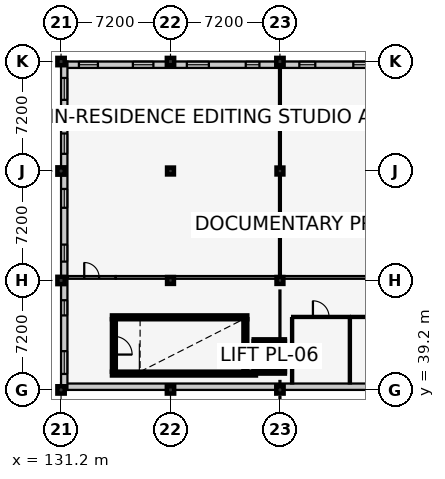
"""IFC4 building model, lengths in metres.
Left out: names, types, materials, properties, quantities, classifications, styles, units other than length and angle.
Written with IfcOpenShell. Run it as: python <this file> out.ifc"""

import sys

from ifc_helpers import new_model, si_unit, direction, frame, frame_2d, origin, origin_2d, place, context, subcontext, project, spatial, rectangle, extrude, element, fill, save


model = new_model("IFC4")
c1 = context("Model", 3, precision=1e-05, world=origin(), true_north=direction((0.0, 1.0)))
c2 = subcontext(c1, "Body", "Model", "MODEL_VIEW")
j1 = project(units=[si_unit("LENGTHUNIT", "METRE"), si_unit("PLANEANGLEUNIT", "RADIAN")], contexts=[c1])
p1 = place(None, origin())
s1 = spatial("IfcSite", under=j1, at=p1, CompositionType="ELEMENT")
p2 = place(p1, origin())
s2 = spatial("IfcBuilding", under=s1, at=p2, CompositionType="ELEMENT")
p3 = place(p2, frame((0.0, 0.0, 13.8)))
s3 = spatial("IfcBuildingStorey", under=s2, at=p3, CompositionType="ELEMENT", Elevation=13.8)
for number, where, z_axis, x_axis in (
    (1, (131.2, 39.2, 0.0), (0.0, 0.0, 1.0), (1.0, 0.0, 0.0)),
    (2, (131.2, 46.4, 0.0), (0.0, 0.0, 1.0), (1.0, 0.0, 0.0)),
    (3, (131.2, 53.6, 0.0), (0.0, 0.0, 1.0), (1.0, 0.0, 0.0)),
    (4, (131.2, 60.8, 0.0), (0.0, 0.0, 1.0), (1.0, 0.0, 0.0)),
    (5, (138.4, 39.2, 0.0), (0.0, 0.0, 1.0), (1.0, 0.0, 0.0)),
):
    element("IfcColumn", number, at=place(p3, frame(where, z_axis=z_axis, x_axis=x_axis)), inside=s3, PredefinedType="COLUMN", context=c2, shape_type="SweptSolid", body=[
        extrude(rectangle(XDim=0.48, YDim=0.48, at=origin_2d()), origin(), (0.0, 0.0, 1.0), 4.2),
    ])
for number, where, z_axis, x_axis in (
    (6, (138.4, 46.4, 0.0), (0.0, 0.0, 1.0), (1.0, 0.0, 0.0)),
    (7, (138.4, 53.6, 0.0), (0.0, 0.0, 1.0), (1.0, 0.0, 0.0)),
):
    element("IfcColumn", number, at=place(p3, frame(where, z_axis=z_axis, x_axis=x_axis)), inside=s3, PredefinedType="COLUMN", context=c2, shape_type="SweptSolid", body=[
        extrude(rectangle(XDim=0.45, YDim=0.45, at=origin_2d()), origin(), (0.0, 0.0, 1.0), 4.2),
    ])
for number, where, z_axis, x_axis in (
    (8, (138.4, 60.8, 0.0), (0.0, 0.0, 1.0), (1.0, 0.0, 0.0)),
    (9, (145.6, 39.2, 0.0), (0.0, 0.0, 1.0), (1.0, 0.0, 0.0)),
):
    element("IfcColumn", number, at=place(p3, frame(where, z_axis=z_axis, x_axis=x_axis)), inside=s3, PredefinedType="COLUMN", context=c2, shape_type="SweptSolid", body=[
        extrude(rectangle(XDim=0.48, YDim=0.48, at=origin_2d()), origin(), (0.0, 0.0, 1.0), 4.2),
    ])
for number, where, z_axis, x_axis in (
    (10, (145.6, 46.4, 0.0), (0.0, 0.0, 1.0), (1.0, 0.0, 0.0)),
    (11, (145.6, 53.6, 0.0), (0.0, 0.0, 1.0), (1.0, 0.0, 0.0)),
):
    element("IfcColumn", number, at=place(p3, frame(where, z_axis=z_axis, x_axis=x_axis)), inside=s3, PredefinedType="COLUMN", context=c2, shape_type="SweptSolid", body=[
        extrude(rectangle(XDim=0.45, YDim=0.45, at=origin_2d()), origin(), (0.0, 0.0, 1.0), 4.2),
    ])
p4 = place(p3, frame((145.6, 60.8, 0.0), z_axis=(0.0, 0.0, 1.0), x_axis=(1.0, 0.0, 0.0)))
e12 = element("IfcColumn", 12, at=p4, inside=s3, PredefinedType="COLUMN", context=c2, shape_type="SweptSolid", body=[
    extrude(rectangle(XDim=0.48, YDim=0.48, at=origin_2d()), origin(), (0.0, 0.0, 1.0), 4.2),
])
p5 = place(p3, frame((160.0, 39.41, 0.0), z_axis=(0.0, 0.0, 1.0), x_axis=(-1.0, 0.0, 0.0)))
e13 = element("IfcWall", 13, at=p5, inside=s3, PredefinedType="SOLIDWALL", context=c2, shape_type="SweptSolid", body=[
    extrude(rectangle(XDim=28.8, YDim=0.42, at=frame_2d((14.4, 0.0))), origin(), (0.0, 0.0, 1.0), 3.255),
])
p6 = place(p3, frame((131.2, 60.59, 0.0), z_axis=(0.0, 0.0, 1.0), x_axis=(1.0, 0.0, 0.0)))
e14 = element("IfcWall", 14, at=p6, inside=s3, PredefinedType="SOLIDWALL", context=c2, shape_type="SweptSolid", body=[
    extrude(rectangle(XDim=28.8, YDim=0.42, at=frame_2d((14.4, 0.0))), origin(), (0.0, 0.0, 1.0), 3.255),
])
p7 = place(p6, frame((1.175, 0.0, 0.9)))
e15 = element("IfcOpeningElement", 15, at=p7, cuts=e14, PredefinedType="OPENING", context=c2, shape_type="SweptSolid", body=[
    extrude(rectangle(XDim=1.25, YDim=1.45, at=frame_2d((0.625, 0.725))), frame((0.0, 0.222, 0.0), z_axis=(0.0, -1.0, 0.0), x_axis=(1.0, 0.0, 0.0)), (0.0, 0.0, 1.0), 0.444),
])
p8 = place(p6, frame((4.725, 0.0, 0.9)))
e16 = element("IfcOpeningElement", 16, at=p8, cuts=e14, PredefinedType="OPENING", context=c2, shape_type="SweptSolid", body=[
    extrude(rectangle(XDim=1.35, YDim=1.45, at=frame_2d((0.675, 0.725))), frame((0.0, 0.222, 0.0), z_axis=(0.0, -1.0, 0.0), x_axis=(1.0, 0.0, 0.0)), (0.0, 0.0, 1.0), 0.444),
])
p9 = place(p6, frame((8.275, 0.0, 0.9)))
e17 = element("IfcOpeningElement", 17, at=p9, cuts=e14, PredefinedType="OPENING", context=c2, shape_type="SweptSolid", body=[
    extrude(rectangle(XDim=1.45, YDim=1.45, at=frame_2d((0.725, 0.725))), frame((0.0, 0.222, 0.0), z_axis=(0.0, -1.0, 0.0), x_axis=(1.0, 0.0, 0.0)), (0.0, 0.0, 1.0), 0.444),
])
p10 = place(p6, frame((12.15, 0.0, 0.9)))
e18 = element("IfcOpeningElement", 18, at=p10, cuts=e14, PredefinedType="OPENING", context=c2, shape_type="SweptSolid", body=[
    extrude(rectangle(XDim=0.9, YDim=1.6, at=frame_2d((0.45, 0.8))), frame((0.0, 0.222, 0.0), z_axis=(0.0, -1.0, 0.0), x_axis=(1.0, 0.0, 0.0)), (0.0, 0.0, 1.0), 0.444),
])
p11 = place(p6, frame((15.675, 0.0, 0.9)))
e19 = element("IfcOpeningElement", 19, at=p11, cuts=e14, PredefinedType="OPENING", context=c2, shape_type="SweptSolid", body=[
    extrude(rectangle(XDim=1.05, YDim=1.6, at=frame_2d((0.525, 0.8))), frame((0.0, 0.222, 0.0), z_axis=(0.0, -1.0, 0.0), x_axis=(1.0, 0.0, 0.0)), (0.0, 0.0, 1.0), 0.444),
])
p12 = place(p6, frame((19.225, 0.0, 0.9)))
e20 = element("IfcOpeningElement", 20, at=p12, cuts=e14, PredefinedType="OPENING", context=c2, shape_type="SweptSolid", body=[
    extrude(rectangle(XDim=1.15, YDim=1.6, at=frame_2d((0.575, 0.8))), frame((0.0, 0.222, 0.0), z_axis=(0.0, -1.0, 0.0), x_axis=(1.0, 0.0, 0.0)), (0.0, 0.0, 1.0), 0.444),
])
p13 = place(p6, frame((22.775, 0.0, 0.9)))
e21 = element("IfcOpeningElement", 21, at=p13, cuts=e14, PredefinedType="OPENING", context=c2, shape_type="SweptSolid", body=[
    extrude(rectangle(XDim=1.25, YDim=1.6, at=frame_2d((0.625, 0.8))), frame((0.0, 0.222, 0.0), z_axis=(0.0, -1.0, 0.0), x_axis=(1.0, 0.0, 0.0)), (0.0, 0.0, 1.0), 0.444),
])
p14 = place(p6, frame((26.31, 0.0, 0.9)))
e22 = element("IfcOpeningElement", 22, at=p14, cuts=e14, PredefinedType="OPENING", context=c2, shape_type="SweptSolid", body=[
    extrude(rectangle(XDim=1.38, YDim=1.6, at=frame_2d((0.69, 0.8))), frame((0.0, 0.222, 0.0), z_axis=(0.0, -1.0, 0.0), x_axis=(1.0, 0.0, 0.0)), (0.0, 0.0, 1.0), 0.444),
])
p15 = place(p3, frame((131.41, 39.2, 0.0), z_axis=(0.0, 0.0, 1.0), x_axis=(0.0, 1.0, 0.0)))
e23 = element("IfcWall", 23, at=p15, inside=s3, PredefinedType="SOLIDWALL", context=c2, shape_type="SweptSolid", body=[
    extrude(rectangle(XDim=21.6, YDim=0.42, at=frame_2d((10.8, 0.0))), origin(), (0.0, 0.0, 1.0), 3.215),
])
p16 = place(p15, frame((1.05, 0.0, 0.9)))
e24 = element("IfcOpeningElement", 24, at=p16, cuts=e23, PredefinedType="OPENING", context=c2, shape_type="SweptSolid", body=[
    extrude(rectangle(XDim=1.5, YDim=1.6, at=frame_2d((0.75, 0.8))), frame((0.0, 0.222, 0.0), z_axis=(0.0, -1.0, 0.0), x_axis=(1.0, 0.0, 0.0)), (0.0, 0.0, 1.0), 0.444),
])
p17 = place(p15, frame((4.9, 0.0, 0.9)))
e25 = element("IfcOpeningElement", 25, at=p17, cuts=e23, PredefinedType="OPENING", context=c2, shape_type="SweptSolid", body=[
    extrude(rectangle(XDim=1.0, YDim=1.75, at=frame_2d((0.5, 0.875))), frame((0.0, 0.222, 0.0), z_axis=(0.0, -1.0, 0.0), x_axis=(1.0, 0.0, 0.0)), (0.0, 0.0, 1.0), 0.444),
])
p18 = place(p15, frame((8.44, 0.0, 0.9)))
e26 = element("IfcOpeningElement", 26, at=p18, cuts=e23, PredefinedType="OPENING", context=c2, shape_type="SweptSolid", body=[
    extrude(rectangle(XDim=1.12, YDim=1.75, at=frame_2d((0.56, 0.875))), frame((0.0, 0.222, 0.0), z_axis=(0.0, -1.0, 0.0), x_axis=(1.0, 0.0, 0.0)), (0.0, 0.0, 1.0), 0.444),
])
p19 = place(p15, frame((11.98, 0.0, 0.9)))
e27 = element("IfcOpeningElement", 27, at=p19, cuts=e23, PredefinedType="OPENING", context=c2, shape_type="SweptSolid", body=[
    extrude(rectangle(XDim=1.24, YDim=1.75, at=frame_2d((0.62, 0.875))), frame((0.0, 0.222, 0.0), z_axis=(0.0, -1.0, 0.0), x_axis=(1.0, 0.0, 0.0)), (0.0, 0.0, 1.0), 0.444),
])
p20 = place(p15, frame((15.53, 0.0, 0.9)))
e28 = element("IfcOpeningElement", 28, at=p20, cuts=e23, PredefinedType="OPENING", context=c2, shape_type="SweptSolid", body=[
    extrude(rectangle(XDim=1.34, YDim=1.75, at=frame_2d((0.67, 0.875))), frame((0.0, 0.222, 0.0), z_axis=(0.0, -1.0, 0.0), x_axis=(1.0, 0.0, 0.0)), (0.0, 0.0, 1.0), 0.444),
])
p21 = place(p15, frame((19.08, 0.0, 0.9)))
e29 = element("IfcOpeningElement", 29, at=p21, cuts=e23, PredefinedType="OPENING", context=c2, shape_type="SweptSolid", body=[
    extrude(rectangle(XDim=1.44, YDim=1.75, at=frame_2d((0.72, 0.875))), frame((0.0, 0.222, 0.0), z_axis=(0.0, -1.0, 0.0), x_axis=(1.0, 0.0, 0.0)), (0.0, 0.0, 1.0), 0.444),
])
p22 = place(p3, frame((134.55, 40.275, 0.0), z_axis=(0.0, 0.0, 1.0), x_axis=(1.0, 0.0, 0.0)))
e30 = element("IfcWall", 30, at=p22, inside=s3, PredefinedType="SHEAR", context=c2, shape_type="SweptSolid", body=[
    extrude(rectangle(XDim=9.47, YDim=0.25, at=frame_2d((4.735, 0.0))), origin(), (0.0, 0.0, 1.0), 3.96),
])
p23 = place(p3, frame((143.45, 43.975, 0.0), z_axis=(0.0, 0.0, 1.0), x_axis=(-1.0, 0.0, 0.0)))
e31 = element("IfcWall", 31, at=p23, inside=s3, PredefinedType="SHEAR", context=c2, shape_type="SweptSolid", body=[
    extrude(rectangle(XDim=8.9, YDim=0.25, at=frame_2d((4.45, 0.0))), origin(), (0.0, 0.0, 1.0), 3.96),
])
p24 = place(p3, frame((134.675, 43.85, 0.0), z_axis=(0.0, 0.0, 1.0), x_axis=(0.0, -1.0, 0.0)))
e32 = element("IfcWall", 32, at=p24, inside=s3, PredefinedType="SHEAR", context=c2, shape_type="SweptSolid", body=[
    extrude(rectangle(XDim=3.45, YDim=0.25, at=frame_2d((1.725, 0.0))), origin(), (0.0, 0.0, 1.0), 3.96),
])
p25 = place(p24, frame((1.125, 0.0, 0.0)))
e33 = element("IfcOpeningElement", 33, at=p25, cuts=e32, PredefinedType="OPENING", context=c2, shape_type="SweptSolid", body=[
    extrude(rectangle(XDim=1.2, YDim=2.15, at=frame_2d((0.6, 1.075))), frame((0.0, 0.137, 0.0), z_axis=(0.0, -1.0, 0.0), x_axis=(1.0, 0.0, 0.0)), (0.0, 0.0, 1.0), 0.274),
])
p26 = place(p3, frame((143.325, 40.4, 0.0), z_axis=(0.0, 0.0, 1.0), x_axis=(0.0, 1.0, 0.0)))
e34 = element("IfcWall", 34, at=p26, inside=s3, PredefinedType="SHEAR", context=c2, shape_type="SweptSolid", body=[
    extrude(rectangle(XDim=3.45, YDim=0.25, at=frame_2d((1.725, 0.0))), origin(), (0.0, 0.0, 1.0), 3.96),
])
p27 = place(p3, frame((143.875, 40.4, 0.0), z_axis=(0.0, 0.0, 1.0), x_axis=(1.0, 0.0, 0.0)))
e35 = element("IfcWall", 35, at=p27, inside=s3, PredefinedType="SHEAR", context=c2, shape_type="SweptSolid", body=[
    extrude(rectangle(XDim=2.05, YDim=0.25, at=frame_2d((1.025, 0.0))), origin(), (0.0, 0.0, 1.0), 3.96),
])
p28 = place(p3, frame((145.925, 42.4, 0.0), z_axis=(0.0, 0.0, 1.0), x_axis=(-1.0, 0.0, 0.0)))
e36 = element("IfcWall", 36, at=p28, inside=s3, PredefinedType="SHEAR", context=c2, shape_type="SweptSolid", body=[
    extrude(rectangle(XDim=2.05, YDim=0.25, at=frame_2d((1.025, 0.0))), origin(), (0.0, 0.0, 1.0), 3.96),
])
p29 = place(p28, frame((0.55, 0.0, 0.0)))
e37 = element("IfcOpeningElement", 37, at=p29, cuts=e36, PredefinedType="OPENING", context=c2, shape_type="SweptSolid", body=[
    extrude(rectangle(XDim=0.95, YDim=2.1, at=frame_2d((0.475, 1.05))), frame((0.0, 0.137, 0.0), z_axis=(0.0, -1.0, 0.0), x_axis=(1.0, 0.0, 0.0)), (0.0, 0.0, 1.0), 0.274),
])
for number, where, z_axis, x_axis in (
    (38, (144.0, 42.4, 0.0), (0.0, 0.0, 1.0), (0.0, -1.0, 0.0)),
    (39, (145.8, 40.4, 0.0), (0.0, 0.0, 1.0), (0.0, 1.0, 0.0)),
):
    element("IfcWall", number, at=place(p3, frame(where, z_axis=z_axis, x_axis=x_axis)), inside=s3, PredefinedType="SHEAR", context=c2, shape_type="SweptSolid", body=[
        extrude(rectangle(XDim=2.0, YDim=0.25, at=frame_2d((1.0, 0.0))), origin(), (0.0, 0.0, 1.0), 3.96),
    ])
p30 = place(p3, frame((131.63, 46.6, 0.0), z_axis=(0.0, 0.0, 1.0), x_axis=(1.0, 0.0, 0.0)))
e40 = element("IfcWall", 40, at=p30, inside=s3, PredefinedType="PARTITIONING", context=c2, shape_type="SweptSolid", body=[
    extrude(rectangle(XDim=3.17, YDim=0.18, at=frame_2d((1.585, 0.0))), origin(), (0.0, 0.0, 1.0), 3.235),
])
p31 = place(p30, frame((1.095, 0.0, 0.0)))
e41 = element("IfcOpeningElement", 41, at=p31, cuts=e40, PredefinedType="OPENING", context=c2, shape_type="SweptSolid", body=[
    extrude(rectangle(XDim=0.98, YDim=2.12, at=frame_2d((0.49, 1.06))), frame((0.0, 0.102, 0.0), z_axis=(0.0, -1.0, 0.0), x_axis=(1.0, 0.0, 0.0)), (0.0, 0.0, 1.0), 0.204),
])
p32 = place(p3, frame((134.8, 46.6, 0.0), z_axis=(0.0, 0.0, 1.0), x_axis=(1.0, 0.0, 0.0)))
e42 = element("IfcWall", 42, at=p32, inside=s3, PredefinedType="PARTITIONING", context=c2, shape_type="SweptSolid", body=[
    extrude(rectangle(XDim=24.77, YDim=0.18, at=frame_2d((12.385, 0.0))), origin(), (0.0, 0.0, 1.0), 3.085),
])
p33 = place(p32, frame((23.56, 0.0, 0.0)))
e43 = element("IfcOpeningElement", 43, at=p33, cuts=e42, PredefinedType="OPENING", context=c2, shape_type="SweptSolid", body=[
    extrude(rectangle(XDim=0.96, YDim=2.1, at=frame_2d((0.48, 1.05))), frame((0.0, 0.102, 0.0), z_axis=(0.0, -1.0, 0.0), x_axis=(1.0, 0.0, 0.0)), (0.0, 0.0, 1.0), 0.204),
])
p34 = place(p3, frame((145.6, 46.7, 0.0), z_axis=(0.0, 0.0, 1.0), x_axis=(0.0, 1.0, 0.0)))
e44 = element("IfcWall", 44, at=p34, inside=s3, PredefinedType="PARTITIONING", context=c2, shape_type="SweptSolid", body=[
    extrude(rectangle(XDim=13.67, YDim=0.125, at=frame_2d((6.835, 0.0))), origin(), (0.0, 0.0, 1.0), 3.335),
])
p35 = place(p3, frame((146.4, 44.0, 0.0), z_axis=(0.0, 0.0, 1.0), x_axis=(1.0, 0.0, 0.0)))
e45 = element("IfcWall", 45, at=p35, inside=s3, PredefinedType="PARTITIONING", context=c2, shape_type="SweptSolid", body=[
    extrude(rectangle(XDim=3.8, YDim=0.14, at=frame_2d((1.9, 0.0))), origin(), (0.0, 0.0, 1.0), 3.96),
])
p36 = place(p35, frame((1.37, 0.0, 0.0)))
e46 = element("IfcOpeningElement", 46, at=p36, cuts=e45, PredefinedType="OPENING", context=c2, shape_type="SweptSolid", body=[
    extrude(rectangle(XDim=1.06, YDim=2.1, at=frame_2d((0.53, 1.05))), frame((0.0, 0.082, 0.0), z_axis=(0.0, -1.0, 0.0), x_axis=(1.0, 0.0, 0.0)), (0.0, 0.0, 1.0), 0.164),
])
for number, where, z_axis, x_axis in (
    (47, (146.4, 39.63, 0.0), (0.0, 0.0, 1.0), (0.0, 1.0, 0.0)),
    (48, (150.2, 39.63, 0.0), (0.0, 0.0, 1.0), (0.0, 1.0, 0.0)),
):
    element("IfcWall", number, at=place(p3, frame(where, z_axis=z_axis, x_axis=x_axis)), inside=s3, PredefinedType="PARTITIONING", context=c2, shape_type="SweptSolid", body=[
        extrude(rectangle(XDim=4.29, YDim=0.14, at=frame_2d((2.145, 0.0))), origin(), (0.0, 0.0, 1.0), 3.96),
    ])
p37 = place(p3, frame((150.28, 44.0, 0.0), z_axis=(0.0, 0.0, 1.0), x_axis=(1.0, 0.0, 0.0)))
e49 = element("IfcWall", 49, at=p37, inside=s3, PredefinedType="PARTITIONING", context=c2, shape_type="SweptSolid", body=[
    extrude(rectangle(XDim=4.52, YDim=0.14, at=frame_2d((2.26, 0.0))), origin(), (0.0, 0.0, 1.0), 3.96),
])
p38 = place(p37, frame((1.815, 0.0, 0.0)))
e50 = element("IfcOpeningElement", 50, at=p38, cuts=e49, PredefinedType="OPENING", context=c2, shape_type="SweptSolid", body=[
    extrude(rectangle(XDim=0.89, YDim=2.05, at=frame_2d((0.445, 1.025))), frame((0.0, 0.082, 0.0), z_axis=(0.0, -1.0, 0.0), x_axis=(1.0, 0.0, 0.0)), (0.0, 0.0, 1.0), 0.164),
])
p39 = place(p7, origin())
e51 = element("IfcWindow", 51, at=p39, inside=s3, PartitioningType="SINGLE_PANEL", PredefinedType="WINDOW", context=c2, shape_type="SweptSolid", body=[
    extrude(rectangle(XDim=1.25, YDim=1.45, at=frame_2d((0.625, 0.725))), frame((0.0, 0.03, 0.0), z_axis=(0.0, -1.0, 0.0), x_axis=(1.0, 0.0, 0.0)), (0.0, 0.0, 1.0), 0.06),
])
fill(e15, e51)
p40 = place(p8, origin())
e52 = element("IfcWindow", 52, at=p40, inside=s3, PartitioningType="SINGLE_PANEL", PredefinedType="WINDOW", context=c2, shape_type="SweptSolid", body=[
    extrude(rectangle(XDim=1.35, YDim=1.45, at=frame_2d((0.675, 0.725))), frame((0.0, 0.03, 0.0), z_axis=(0.0, -1.0, 0.0), x_axis=(1.0, 0.0, 0.0)), (0.0, 0.0, 1.0), 0.06),
])
fill(e16, e52)
p41 = place(p9, origin())
e53 = element("IfcWindow", 53, at=p41, inside=s3, PartitioningType="SINGLE_PANEL", PredefinedType="WINDOW", context=c2, shape_type="SweptSolid", body=[
    extrude(rectangle(XDim=1.45, YDim=1.45, at=frame_2d((0.725, 0.725))), frame((0.0, 0.03, 0.0), z_axis=(0.0, -1.0, 0.0), x_axis=(1.0, 0.0, 0.0)), (0.0, 0.0, 1.0), 0.06),
])
fill(e17, e53)
p42 = place(p10, origin())
e54 = element("IfcWindow", 54, at=p42, inside=s3, PartitioningType="SINGLE_PANEL", PredefinedType="WINDOW", context=c2, shape_type="SweptSolid", body=[
    extrude(rectangle(XDim=0.9, YDim=1.6, at=frame_2d((0.45, 0.8))), frame((0.0, 0.03, 0.0), z_axis=(0.0, -1.0, 0.0), x_axis=(1.0, 0.0, 0.0)), (0.0, 0.0, 1.0), 0.06),
])
fill(e18, e54)
p43 = place(p11, origin())
e55 = element("IfcWindow", 55, at=p43, inside=s3, PartitioningType="SINGLE_PANEL", PredefinedType="WINDOW", context=c2, shape_type="SweptSolid", body=[
    extrude(rectangle(XDim=1.05, YDim=1.6, at=frame_2d((0.525, 0.8))), frame((0.0, 0.03, 0.0), z_axis=(0.0, -1.0, 0.0), x_axis=(1.0, 0.0, 0.0)), (0.0, 0.0, 1.0), 0.06),
])
fill(e19, e55)
p44 = place(p12, origin())
e56 = element("IfcWindow", 56, at=p44, inside=s3, PartitioningType="SINGLE_PANEL", PredefinedType="WINDOW", context=c2, shape_type="SweptSolid", body=[
    extrude(rectangle(XDim=1.15, YDim=1.6, at=frame_2d((0.575, 0.8))), frame((0.0, 0.03, 0.0), z_axis=(0.0, -1.0, 0.0), x_axis=(1.0, 0.0, 0.0)), (0.0, 0.0, 1.0), 0.06),
])
fill(e20, e56)
p45 = place(p16, origin())
e57 = element("IfcWindow", 57, at=p45, inside=s3, PartitioningType="SINGLE_PANEL", PredefinedType="WINDOW", context=c2, shape_type="SweptSolid", body=[
    extrude(rectangle(XDim=1.5, YDim=1.6, at=frame_2d((0.75, 0.8))), frame((0.0, 0.03, 0.0), z_axis=(0.0, -1.0, 0.0), x_axis=(1.0, 0.0, 0.0)), (0.0, 0.0, 1.0), 0.06),
])
fill(e24, e57)
p46 = place(p17, origin())
e58 = element("IfcWindow", 58, at=p46, inside=s3, PartitioningType="SINGLE_PANEL", PredefinedType="WINDOW", context=c2, shape_type="SweptSolid", body=[
    extrude(rectangle(XDim=1.0, YDim=1.75, at=frame_2d((0.5, 0.875))), frame((0.0, 0.03, 0.0), z_axis=(0.0, -1.0, 0.0), x_axis=(1.0, 0.0, 0.0)), (0.0, 0.0, 1.0), 0.06),
])
fill(e25, e58)
p47 = place(p18, origin())
e59 = element("IfcWindow", 59, at=p47, inside=s3, PartitioningType="SINGLE_PANEL", PredefinedType="WINDOW", context=c2, shape_type="SweptSolid", body=[
    extrude(rectangle(XDim=1.12, YDim=1.75, at=frame_2d((0.56, 0.875))), frame((0.0, 0.03, 0.0), z_axis=(0.0, -1.0, 0.0), x_axis=(1.0, 0.0, 0.0)), (0.0, 0.0, 1.0), 0.06),
])
fill(e26, e59)
p48 = place(p19, origin())
e60 = element("IfcWindow", 60, at=p48, inside=s3, PartitioningType="SINGLE_PANEL", PredefinedType="WINDOW", context=c2, shape_type="SweptSolid", body=[
    extrude(rectangle(XDim=1.24, YDim=1.75, at=frame_2d((0.62, 0.875))), frame((0.0, 0.03, 0.0), z_axis=(0.0, -1.0, 0.0), x_axis=(1.0, 0.0, 0.0)), (0.0, 0.0, 1.0), 0.06),
])
fill(e27, e60)
p49 = place(p20, origin())
e61 = element("IfcWindow", 61, at=p49, inside=s3, PartitioningType="SINGLE_PANEL", PredefinedType="WINDOW", context=c2, shape_type="SweptSolid", body=[
    extrude(rectangle(XDim=1.34, YDim=1.75, at=frame_2d((0.67, 0.875))), frame((0.0, 0.03, 0.0), z_axis=(0.0, -1.0, 0.0), x_axis=(1.0, 0.0, 0.0)), (0.0, 0.0, 1.0), 0.06),
])
fill(e28, e61)
p50 = place(p21, origin())
e62 = element("IfcWindow", 62, at=p50, inside=s3, PartitioningType="SINGLE_PANEL", PredefinedType="WINDOW", context=c2, shape_type="SweptSolid", body=[
    extrude(rectangle(XDim=1.44, YDim=1.75, at=frame_2d((0.72, 0.875))), frame((0.0, 0.03, 0.0), z_axis=(0.0, -1.0, 0.0), x_axis=(1.0, 0.0, 0.0)), (0.0, 0.0, 1.0), 0.06),
])
fill(e29, e62)
p51 = place(p25, origin())
e63 = element("IfcDoor", 63, at=p51, inside=s3, OperationType="SINGLE_SWING_RIGHT", PredefinedType="DOOR", context=c2, shape_type="SweptSolid", body=[
    extrude(rectangle(XDim=1.2, YDim=2.15, at=frame_2d((0.6, 1.075))), frame((0.0, 0.025, 0.0), z_axis=(0.0, -1.0, 0.0), x_axis=(1.0, 0.0, 0.0)), (0.0, 0.0, 1.0), 0.05),
])
fill(e33, e63)
p52 = place(p29, origin())
e64 = element("IfcDoor", 64, at=p52, inside=s3, OperationType="SLIDING_TO_LEFT", PredefinedType="DOOR", context=c2, shape_type="SweptSolid", body=[
    extrude(rectangle(XDim=0.95, YDim=2.1, at=frame_2d((0.475, 1.05))), frame((0.0, 0.025, 0.0), z_axis=(0.0, -1.0, 0.0), x_axis=(1.0, 0.0, 0.0)), (0.0, 0.0, 1.0), 0.05),
])
fill(e37, e64)
p53 = place(p31, origin())
e65 = element("IfcDoor", 65, at=p53, inside=s3, OperationType="SINGLE_SWING_LEFT", PredefinedType="DOOR", context=c2, shape_type="SweptSolid", body=[
    extrude(rectangle(XDim=0.98, YDim=2.12, at=frame_2d((0.49, 1.06))), frame((0.0, 0.025, 0.0), z_axis=(0.0, -1.0, 0.0), x_axis=(1.0, 0.0, 0.0)), (0.0, 0.0, 1.0), 0.05),
])
fill(e41, e65)
p54 = place(p36, origin())
e66 = element("IfcDoor", 66, at=p54, inside=s3, OperationType="SINGLE_SWING_LEFT", PredefinedType="DOOR", context=c2, shape_type="SweptSolid", body=[
    extrude(rectangle(XDim=1.06, YDim=2.1, at=frame_2d((0.53, 1.05))), frame((0.0, 0.025, 0.0), z_axis=(0.0, -1.0, 0.0), x_axis=(1.0, 0.0, 0.0)), (0.0, 0.0, 1.0), 0.05),
])
fill(e46, e66)
save(model, sys.argv[1])
